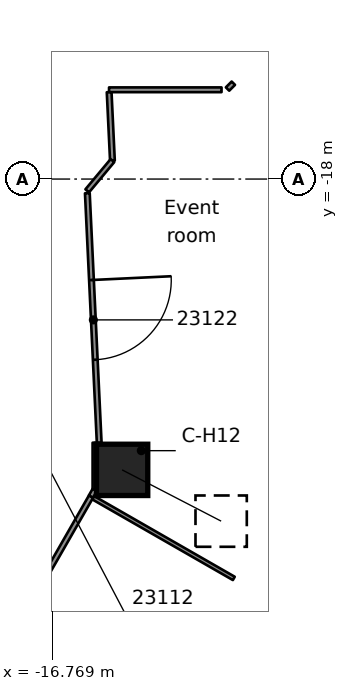
"""IFC4 building model, lengths in metres.
Left out: names, types, materials, properties, quantities, classifications, styles, units other than length and angle.
Written with IfcOpenShell. Run it as: python <this file> out.ifc"""

import sys

from ifc_helpers import new_model, si_unit, direction, frame, frame_2d, origin, origin_2d, place, context, subcontext, project, spatial, rectangle, extrude, element, fill, save


model = new_model("IFC4")
c1 = context("Model", 3, precision=1e-05, world=origin(), true_north=direction((0.0, 1.0)))
c2 = subcontext(c1, "Body", "Model", "MODEL_VIEW")
j1 = project(units=[si_unit("LENGTHUNIT", "METRE"), si_unit("PLANEANGLEUNIT", "RADIAN")], contexts=[c1])
p1 = place(None, origin())
s1 = spatial("IfcSite", under=j1, at=p1, CompositionType="ELEMENT")
p2 = place(p1, origin())
s2 = spatial("IfcBuilding", under=s1, at=p2, CompositionType="ELEMENT")
p3 = place(p2, frame((0.0, 0.0, 119.7)))
s3 = spatial("IfcBuildingStorey", under=s2, at=p3, CompositionType="ELEMENT", Elevation=119.7)
p4 = place(p3, frame((-14.927, -25.652, 0.467), z_axis=(0.613977163628, -0.317802494758, 0.722518938761), x_axis=(0.459683193638, 0.888082969934, 0.0)))
e1 = element("IfcColumn", 1, at=p4, inside=s3, PredefinedType="COLUMN", context=c2, shape_type="SweptSolid", body=[
    extrude(rectangle(XDim=1.35, YDim=1.35, at=origin_2d()), origin(), (0.0, 0.0, 1.0), 4.244),
])
p5 = place(p3, frame((-15.842, -18.372, 0.0), z_axis=(0.0, 0.0, 1.0), x_axis=(0.047473375222, -0.998872503699, 0.0)))
e2 = element("IfcWall", 2, at=p5, inside=s3, PredefinedType="PARTITIONING", context=c2, shape_type="SweptSolid", body=[
    extrude(rectangle(XDim=6.572, YDim=0.125, at=frame_2d((3.286, 0.0))), origin(), (0.0, 0.0, 1.0), 3.58),
])
p6 = place(p5, frame((2.288, 0.0, 0.0)))
e3 = element("IfcOpeningElement", 3, at=p6, cuts=e2, PredefinedType="OPENING", context=c2, shape_type="SweptSolid", body=[
    extrude(rectangle(XDim=2.1, YDim=2.1, at=frame_2d((1.05, 1.05))), frame((0.0, 0.073, 0.0), z_axis=(0.0, -1.0, 0.0), x_axis=(1.0, 0.0, 0.0)), (0.0, 0.0, 1.0), 0.145),
])
p7 = place(p3, frame((-15.268, -15.713, 0.0), z_axis=(0.0, 0.0, 1.0), x_axis=(0.047770896438, -0.998858319009, 0.0)))
e4 = element("IfcWall", 4, at=p7, inside=s3, PredefinedType="PARTITIONING", context=c2, shape_type="SweptSolid", body=[
    extrude(rectangle(XDim=1.804, YDim=0.125, at=frame_2d((0.902, 0.0))), origin(), (0.0, 0.0, 1.0), 3.58),
])
p8 = place(p3, frame((-15.692, -26.383, 0.0), z_axis=(0.0, 0.0, 1.0), x_axis=(0.867383356102, -0.497640546537, 0.0)))
e5 = element("IfcWall", 5, at=p8, inside=s3, PredefinedType="PARTITIONING", context=c2, shape_type="SweptSolid", body=[
    extrude(rectangle(XDim=4.27, YDim=0.1, at=frame_2d((2.135, 0.0))), origin(), (0.0, 0.0, 1.0), 3.58),
])
p9 = place(p3, frame((-15.271, -15.651, 0.0), z_axis=(0.0, 0.0, 1.0), x_axis=(1.0, 0.0, 0.0)))
e6 = element("IfcWall", 6, at=p9, inside=s3, PredefinedType="PARTITIONING", context=c2, shape_type="SweptSolid", body=[
    extrude(rectangle(XDim=2.96, YDim=0.125, at=frame_2d((1.48, 0.0))), origin(), (0.0, 0.0, 1.0), 3.58),
])
p10 = place(p3, frame((-15.845, -18.31, 0.0), z_axis=(0.0, 0.0, 1.0), x_axis=(0.640439494896, 0.768008628452, 0.0)))
e7 = element("IfcWall", 7, at=p10, inside=s3, PredefinedType="PARTITIONING", context=c2, shape_type="SweptSolid", body=[
    extrude(rectangle(XDim=1.035, YDim=0.125, at=frame_2d((0.518, 0.0))), origin(), (0.0, 0.0, 1.0), 3.58),
])
p11 = place(p3, frame((-12.153, -15.631, 0.0), z_axis=(0.0, 0.0, 1.0), x_axis=(0.707106781187, 0.707106781187, 0.0)))
e8 = element("IfcWall", 8, at=p11, inside=s3, PredefinedType="PARTITIONING", context=c2, shape_type="SweptSolid", body=[
    extrude(rectangle(XDim=0.217, YDim=0.125, at=frame_2d((0.108, 0.0))), origin(), (0.0, 0.0, 1.0), 3.58),
])
p12 = place(p3, frame((-19.277, -32.509, 0.0), z_axis=(0.0, 0.0, 1.0), x_axis=(0.497782718783, 0.867301772673, 0.0)))
e9 = element("IfcWall", 9, at=p12, inside=s3, PredefinedType="PARTITIONING", context=c2, shape_type="SweptSolid", body=[
    extrude(rectangle(XDim=7.098, YDim=0.125, at=frame_2d((3.549, 0.0))), origin(), (0.0, 0.0, 1.0), 3.58),
])
p13 = place(p3, frame((-15.746, -26.352, 0.0), z_axis=(0.0, 0.0, 1.0), x_axis=(0.495888197745, 0.868386374454, 0.0)))
e10 = element("IfcWall", 10, at=p13, inside=s3, PredefinedType="PARTITIONING", context=c2, shape_type="SweptSolid", body=[
    extrude(rectangle(XDim=0.21, YDim=0.125, at=frame_2d((0.105, 0.0))), origin(), (0.0, 0.0, 1.0), 3.58),
])
p14 = place(p3, frame((-15.641, -26.17, 0.0), z_axis=(0.0, 0.0, 1.0), x_axis=(0.0, 1.0, 0.0)))
e11 = element("IfcWall", 11, at=p14, inside=s3, PredefinedType="PARTITIONING", context=c2, shape_type="SweptSolid", body=[
    extrude(rectangle(XDim=1.233, YDim=0.125, at=frame_2d((0.616, 0.0))), origin(), (0.0, 0.0, 1.0), 3.58),
])
p15 = place(p6, origin())
e12 = element("IfcDoor", 12, at=p15, inside=s3, OperationType="DOUBLE_DOOR_SINGLE_SWING", PredefinedType="DOOR", context=c2, shape_type="SweptSolid", body=[
    extrude(rectangle(XDim=2.1, YDim=2.1, at=frame_2d((1.05, 1.05))), frame((0.0, 0.025, 0.0), z_axis=(0.0, -1.0, 0.0), x_axis=(1.0, 0.0, 0.0)), (0.0, 0.0, 1.0), 0.05),
])
fill(e3, e12)
save(model, sys.argv[1])
